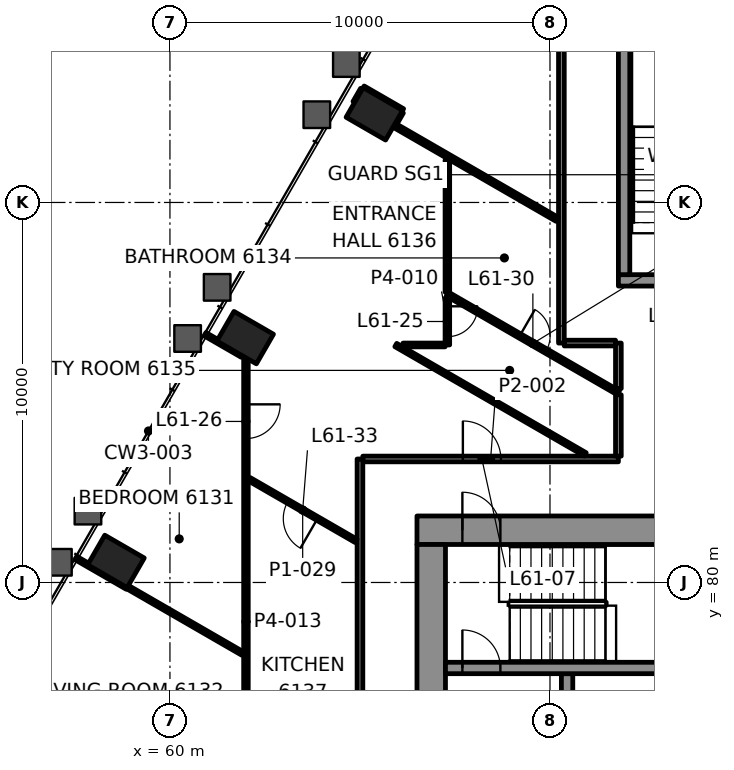
"""IFC4 building model, lengths in metres.
Left out: names, types, materials, properties, quantities, classifications, styles, units other than length and angle.
Written with IfcOpenShell. Run it as: python <this file> out.ifc"""

import sys

from ifc_helpers import new_model, si_unit, direction, frame, frame_2d, origin, origin_2d, place, context, subcontext, project, spatial, rectangle, hollow_rectangle, extrude, element, fill, save


model = new_model("IFC4")
c1 = context("Model", 3, precision=1e-05, world=origin(), true_north=direction((0.0, 1.0)))
c2 = subcontext(c1, "Body", "Model", "MODEL_VIEW")
j1 = project(units=[si_unit("LENGTHUNIT", "METRE"), si_unit("PLANEANGLEUNIT", "RADIAN")], contexts=[c1])
p1 = place(None, origin())
s1 = spatial("IfcSite", under=j1, at=p1, CompositionType="ELEMENT")
p2 = place(p1, origin())
s2 = spatial("IfcBuilding", under=s1, at=p2, CompositionType="ELEMENT")
p3 = place(p2, frame((0.0, 0.0, 260.1)))
s3 = spatial("IfcBuildingStorey", under=s2, at=p3, CompositionType="ELEMENT", Elevation=260.1)
for number, where, z_axis, x_axis in (
    (1, (65.379, 92.332, -0.0), (0.0, 0.0, 1.0), (-0.5, -0.866, 0.0)),
    (2, (61.979, 86.443, -0.0), (0.0, 0.0, 1.0), (-0.5, -0.866, 0.0)),
    (3, (58.579, 80.554, -0.0), (0.0, 0.0, 1.0), (-0.5, -0.866, 0.0)),
):
    element("IfcColumn", number, at=place(p3, frame(where, z_axis=z_axis, x_axis=x_axis)), inside=s3, PredefinedType="COLUMN", context=c2, shape_type="SweptSolid", body=[
        extrude(hollow_rectangle(XDim=0.9, YDim=1.2, WallThickness=0.06, at=origin_2d()), origin(), (0.0, 0.0, 1.0), 3.5),
    ])
p4 = place(p3, frame((66.5, 81.375, 0.0), z_axis=(0.0, 0.0, 1.0), x_axis=(1.0, 0.0, 0.0)))
e4 = element("IfcWall", 4, at=p4, inside=s3, PredefinedType="SHEAR", context=c2, shape_type="SweptSolid", body=[
    extrude(rectangle(XDim=17.0, YDim=0.75, at=frame_2d((8.5, 0.0))), origin(), (0.0, 0.0, 1.0), 3.3),
])
p5 = place(p4, frame((1.195, 0.0, 0.0)))
e5 = element("IfcOpeningElement", 5, at=p5, cuts=e4, PredefinedType="OPENING", context=c2, shape_type="SweptSolid", body=[
    extrude(rectangle(XDim=1.0, YDim=2.1, at=frame_2d((0.5, 1.05))), frame((0.0, 0.385, 0.0), z_axis=(0.0, -1.0, 0.0), x_axis=(1.0, 0.0, 0.0)), (0.0, 0.0, 1.0), 0.77),
])
p6 = place(p4, frame((15.005, 0.0, 0.0)))
e6 = element("IfcOpeningElement", 6, at=p6, cuts=e4, PredefinedType="OPENING", context=c2, shape_type="SweptSolid", body=[
    extrude(rectangle(XDim=1.0, YDim=2.1, at=frame_2d((0.5, 1.05))), frame((0.0, 0.385, 0.0), z_axis=(0.0, -1.0, 0.0), x_axis=(1.0, 0.0, 0.0)), (0.0, 0.0, 1.0), 0.77),
])
p7 = place(p4, frame((8.15, 0.0, 0.0)))
e7 = element("IfcOpeningElement", 7, at=p7, cuts=e4, PredefinedType="OPENING", context=c2, shape_type="SweptSolid", body=[
    extrude(rectangle(XDim=0.9, YDim=2.1, at=frame_2d((0.45, 1.05))), frame((0.0, 0.385, 0.0), z_axis=(0.0, -1.0, 0.0), x_axis=(1.0, 0.0, 0.0)), (0.0, 0.0, 1.0), 0.77),
])
p8 = place(p3, frame((66.875, 69.0, 0.0), z_axis=(0.0, 0.0, 1.0), x_axis=(0.0, 1.0, 0.0)))
e8 = element("IfcWall", 8, at=p8, inside=s3, PredefinedType="SHEAR", context=c2, shape_type="SweptSolid", body=[
    extrude(rectangle(XDim=12.0, YDim=0.75, at=frame_2d((6.0, 0.0))), origin(), (0.0, 0.0, 1.0), 3.3),
])
p9 = place(p8, frame((3.7, 0.0, 0.0)))
e9 = element("IfcOpeningElement", 9, at=p9, cuts=e8, PredefinedType="OPENING", context=c2, shape_type="SweptSolid", body=[
    extrude(rectangle(XDim=1.2, YDim=2.1, at=frame_2d((0.6, 1.05))), frame((0.0, 0.385, 0.0), z_axis=(0.0, -1.0, 0.0), x_axis=(1.0, 0.0, 0.0)), (0.0, 0.0, 1.0), 0.77),
])
p10 = place(p8, frame((0.925, 0.0, 0.0)))
e10 = element("IfcOpeningElement", 10, at=p10, cuts=e8, PredefinedType="OPENING", context=c2, shape_type="SweptSolid", body=[
    extrude(rectangle(XDim=0.9, YDim=2.1, at=frame_2d((0.45, 1.05))), frame((0.0, 0.385, 0.0), z_axis=(0.0, -1.0, 0.0), x_axis=(1.0, 0.0, 0.0)), (0.0, 0.0, 1.0), 0.77),
])
p11 = place(p3, frame((70.45, 75.0, 0.0), z_axis=(0.0, 0.0, 1.0), x_axis=(0.0, 1.0, 0.0)))
e11 = element("IfcWall", 11, at=p11, inside=s3, PredefinedType="SHEAR", context=c2, shape_type="SweptSolid", body=[
    extrude(rectangle(XDim=2.6, YDim=0.3, at=frame_2d((1.3, 0.0))), origin(), (0.0, 0.0, 1.0), 3.3),
])
p12 = place(p11, frame((0.15, 0.0, 0.0)))
e12 = element("IfcOpeningElement", 12, at=p12, cuts=e11, PredefinedType="OPENING", context=c2, shape_type="SweptSolid", body=[
    extrude(rectangle(XDim=1.1, YDim=2.1, at=frame_2d((0.55, 1.05))), frame((0.0, 0.16, 0.0), z_axis=(0.0, -1.0, 0.0), x_axis=(1.0, 0.0, 0.0)), (0.0, 0.0, 1.0), 0.32),
])
p13 = place(p3, frame((67.25, 77.75, 0.0), z_axis=(0.0, 0.0, 1.0), x_axis=(1.0, 0.0, 0.0)))
e13 = element("IfcWall", 13, at=p13, inside=s3, PredefinedType="SHEAR", context=c2, shape_type="SweptSolid", body=[
    extrude(rectangle(XDim=15.5, YDim=0.3, at=frame_2d((7.75, 0.0))), origin(), (0.0, 0.0, 1.0), 3.3),
])
p14 = place(p13, frame((0.445, 0.0, 0.0)))
e14 = element("IfcOpeningElement", 14, at=p14, cuts=e13, PredefinedType="OPENING", context=c2, shape_type="SweptSolid", body=[
    extrude(rectangle(XDim=1.0, YDim=2.1, at=frame_2d((0.5, 1.05))), frame((0.0, 0.16, 0.0), z_axis=(0.0, -1.0, 0.0), x_axis=(1.0, 0.0, 0.0)), (0.0, 0.0, 1.0), 0.32),
])
p15 = place(p3, frame((71.8, 87.95, 0.0), z_axis=(0.0, 0.0, 1.0), x_axis=(1.0, 0.0, 0.0)))
e15 = element("IfcWall", 15, at=p15, inside=s3, PredefinedType="SHEAR", context=c2, shape_type="SweptSolid", body=[
    extrude(rectangle(XDim=6.4, YDim=0.3, at=frame_2d((3.2, 0.0))), origin(), (0.0, 0.0, 1.0), 3.3),
])
p16 = place(p15, frame((1.325, 0.0, 0.0)))
e16 = element("IfcOpeningElement", 16, at=p16, cuts=e15, PredefinedType="OPENING", context=c2, shape_type="SweptSolid", body=[
    extrude(rectangle(XDim=1.0, YDim=2.1, at=frame_2d((0.5, 1.05))), frame((0.0, 0.16, 0.0), z_axis=(0.0, -1.0, 0.0), x_axis=(1.0, 0.0, 0.0)), (0.0, 0.0, 1.0), 0.32),
])
p17 = place(p15, frame((4.125, 0.0, 0.0)))
e17 = element("IfcOpeningElement", 17, at=p17, cuts=e15, PredefinedType="OPENING", context=c2, shape_type="SweptSolid", body=[
    extrude(rectangle(XDim=1.2, YDim=2.1, at=frame_2d((0.6, 1.05))), frame((0.0, 0.16, 0.0), z_axis=(0.0, -1.0, 0.0), x_axis=(1.0, 0.0, 0.0)), (0.0, 0.0, 1.0), 0.32),
])
p18 = place(p3, frame((71.95, 88.1, 0.0), z_axis=(0.0, 0.0, 1.0), x_axis=(0.0, 1.0, 0.0)))
e18 = element("IfcWall", 18, at=p18, inside=s3, PredefinedType="SHEAR", context=c2, shape_type="SweptSolid", body=[
    extrude(rectangle(XDim=6.2, YDim=0.3, at=frame_2d((3.1, 0.0))), origin(), (0.0, 0.0, 1.0), 3.3),
])
p19 = place(p3, frame((65.075, 83.25, 0.0), z_axis=(0.0, 0.0, 1.0), x_axis=(1.0, 0.0, 0.0)))
e19 = element("IfcWall", 19, at=p19, inside=s3, PredefinedType="PARTITIONING", context=c2, shape_type="SweptSolid", body=[
    extrude(rectangle(XDim=6.725, YDim=0.15, at=frame_2d((3.362, 0.0))), origin(), (0.0, 0.0, 1.0), 2.7),
])
p20 = place(p19, frame((2.632, 0.0, 0.0)))
e20 = element("IfcOpeningElement", 20, at=p20, cuts=e19, PredefinedType="OPENING", context=c2, shape_type="SweptSolid", body=[
    extrude(rectangle(XDim=1.0, YDim=2.1, at=frame_2d((0.5, 1.05))), frame((0.0, 0.085, 0.0), z_axis=(0.0, -1.0, 0.0), x_axis=(1.0, 0.0, 0.0)), (0.0, 0.0, 1.0), 0.17),
])
p21 = place(p3, frame((66.133, 86.25, 0.0), z_axis=(0.0, 0.0, 1.0), x_axis=(1.0, 0.0, 0.0)))
e21 = element("IfcWall", 21, at=p21, inside=s3, PredefinedType="PARTITIONING", context=c2, shape_type="SweptSolid", body=[
    extrude(rectangle(XDim=1.106, YDim=0.1, at=frame_2d((0.553, 0.0))), origin(), (0.0, 0.0, 1.0), 2.7),
])
p22 = place(p3, frame((70.375, 86.3, 0.0), z_axis=(0.0, 0.0, 1.0), x_axis=(1.0, 0.0, 0.0)))
e22 = element("IfcWall", 22, at=p22, inside=s3, PredefinedType="PARTITIONING", context=c2, shape_type="SweptSolid", body=[
    extrude(rectangle(XDim=1.35, YDim=0.15, at=frame_2d((0.675, 0.0))), origin(), (0.0, 0.0, 1.0), 2.7),
])
p23 = place(p3, frame((65.929, 92.085, 0.0), z_axis=(0.0, 0.0, 1.0), x_axis=(0.49970167553, 0.866197573001, 0.0)))
e23 = element("IfcWall", 23, at=p23, inside=s3, PredefinedType="PARTITIONING", context=c2, shape_type="SweptSolid", body=[
    extrude(rectangle(XDim=0.339, YDim=0.1, at=frame_2d((0.169, 0.0))), origin(), (0.0, 0.0, 1.0), 2.7),
])
p24 = place(p3, frame((64.86, 92.633, 0.0), z_axis=(0.0, 0.0, 1.0), x_axis=(0.500481453673, 0.865747257882, 0.0)))
e24 = element("IfcWall", 24, at=p24, inside=s3, PredefinedType="PARTITIONING", context=c2, shape_type="SweptSolid", body=[
    extrude(rectangle(XDim=0.399, YDim=0.1, at=frame_2d((0.199, 0.0))), origin(), (0.0, 0.0, 1.0), 2.7),
])
p25 = place(p3, frame((71.8, 83.325, 0.0), z_axis=(0.0, 0.0, 1.0), x_axis=(0.0, 1.0, 0.0)))
e25 = element("IfcWall", 25, at=p25, inside=s3, PredefinedType="PARTITIONING", context=c2, shape_type="SweptSolid", body=[
    extrude(rectangle(XDim=1.614, YDim=0.15, at=frame_2d((0.807, 0.0))), origin(), (0.0, 0.0, 1.0), 2.622),
])
p26 = place(p3, frame((70.3, 86.3, 0.0), z_axis=(0.0, 0.0, 1.0), x_axis=(0.0, 1.0, 0.0)))
e26 = element("IfcWall", 26, at=p26, inside=s3, PredefinedType="PARTITIONING", context=c2, shape_type="SweptSolid", body=[
    extrude(rectangle(XDim=9.8, YDim=0.15, at=frame_2d((4.9, 0.0))), origin(), (0.0, 0.0, 1.0), 2.7),
])
p27 = place(p3, frame((67.3, 87.485, 0.0), z_axis=(0.0, 0.0, 1.0), x_axis=(0.0, -1.0, 0.0)))
e27 = element("IfcWall", 27, at=p27, inside=s3, PredefinedType="PARTITIONING", context=c2, shape_type="SweptSolid", body=[
    extrude(rectangle(XDim=1.234, YDim=0.12, at=frame_2d((0.617, 0.0))), origin(), (0.0, 0.0, 1.0), 2.622),
])
p28 = place(p27, frame((0.217, 0.0, 0.0)))
e28 = element("IfcOpeningElement", 28, at=p28, cuts=e27, PredefinedType="OPENING", context=c2, shape_type="SweptSolid", body=[
    extrude(rectangle(XDim=0.8, YDim=2.1, at=frame_2d((0.4, 1.05))), frame((0.0, 0.07, 0.0), z_axis=(0.0, -1.0, 0.0), x_axis=(1.0, 0.0, 0.0)), (0.0, 0.0, 1.0), 0.14),
])
p29 = place(p3, frame((65.0, 70.352, 0.0), z_axis=(0.0, 0.0, 1.0), x_axis=(0.0, 1.0, 0.0)))
e29 = element("IfcWall", 29, at=p29, inside=s3, PredefinedType="PARTITIONING", context=c2, shape_type="SweptSolid", body=[
    extrude(rectangle(XDim=12.897, YDim=0.15, at=frame_2d((6.449, 0.0))), origin(), (0.0, 0.0, 1.0), 2.7),
])
p30 = place(p3, frame((62.0, 85.912, 0.0), z_axis=(0.0, 0.0, 1.0), x_axis=(0.0, -1.0, 0.0)))
e30 = element("IfcWall", 30, at=p30, inside=s3, PredefinedType="PARTITIONING", context=c2, shape_type="SweptSolid", body=[
    extrude(rectangle(XDim=13.888, YDim=0.12, at=frame_2d((6.944, 0.0))), origin(), (0.0, 0.0, 1.0), 2.7),
])
p31 = place(p30, frame((1.224, 0.0, 0.0)))
e31 = element("IfcOpeningElement", 31, at=p31, cuts=e30, PredefinedType="OPENING", context=c2, shape_type="SweptSolid", body=[
    extrude(rectangle(XDim=0.9, YDim=2.1, at=frame_2d((0.45, 1.05))), frame((0.0, 0.07, 0.0), z_axis=(0.0, -1.0, 0.0), x_axis=(1.0, 0.0, 0.0)), (0.0, 0.0, 1.0), 0.14),
])
p32 = place(p30, frame((9.49, 0.0, 0.0)))
e32 = element("IfcOpeningElement", 32, at=p32, cuts=e30, PredefinedType="OPENING", context=c2, shape_type="SweptSolid", body=[
    extrude(rectangle(XDim=0.9, YDim=2.1, at=frame_2d((0.45, 1.05))), frame((0.0, 0.07, 0.0), z_axis=(0.0, -1.0, 0.0), x_axis=(1.0, 0.0, 0.0)), (0.0, 0.0, 1.0), 0.14),
])
p33 = place(p30, frame((12.466, 0.0, 0.0)))
e33 = element("IfcOpeningElement", 33, at=p33, cuts=e30, PredefinedType="OPENING", context=c2, shape_type="SweptSolid", body=[
    extrude(rectangle(XDim=0.8, YDim=2.1, at=frame_2d((0.4, 1.05))), frame((0.0, 0.07, 0.0), z_axis=(0.0, -1.0, 0.0), x_axis=(1.0, 0.0, 0.0)), (0.0, 0.0, 1.0), 0.14),
])
p34 = place(p3, frame((66.124, 92.422, 0.0), z_axis=(0.0, 0.0, 1.0), x_axis=(-0.865978732077, 0.500080829057, 0.0)))
e34 = element("IfcWall", 34, at=p34, inside=s3, PredefinedType="PARTITIONING", context=c2, shape_type="SweptSolid", body=[
    extrude(rectangle(XDim=1.199, YDim=0.1, at=frame_2d((0.6, 0.0))), origin(), (0.0, 0.0, 1.0), 2.688),
])
p35 = place(p3, frame((70.19, 89.555, 0.0), z_axis=(0.0, 0.0, 1.0), x_axis=(-0.866036249428, 0.499981214323, 0.0)))
e35 = element("IfcWall", 35, at=p35, inside=s3, PredefinedType="PARTITIONING", context=c2, shape_type="SweptSolid", body=[
    extrude(rectangle(XDim=4.955, YDim=0.12, at=frame_2d((2.478, 0.0))), origin(), (0.0, 0.0, 1.0), 2.7),
])
p36 = place(p3, frame((67.3, 87.589, 0.0), z_axis=(0.0, 0.0, 1.0), x_axis=(0.866019710441, -0.50000986103, 0.0)))
e36 = element("IfcWall", 36, at=p36, inside=s3, PredefinedType="PARTITIONING", context=c2, shape_type="SweptSolid", body=[
    extrude(rectangle(XDim=5.196, YDim=0.12, at=frame_2d((2.598, 0.0))), origin(), (0.0, 0.0, 1.0), 2.7),
])
p37 = place(p36, frame((2.198, 0.0, 0.0)))
e37 = element("IfcOpeningElement", 37, at=p37, cuts=e36, PredefinedType="OPENING", context=c2, shape_type="SweptSolid", body=[
    extrude(rectangle(XDim=0.8, YDim=2.1, at=frame_2d((0.4, 1.05))), frame((0.0, 0.07, 0.0), z_axis=(0.0, -1.0, 0.0), x_axis=(1.0, 0.0, 0.0)), (0.0, 0.0, 1.0), 0.14),
])
p38 = place(p3, frame((70.929, 83.37, 0.0), z_axis=(0.0, 0.0, 1.0), x_axis=(-0.866032366698, 0.499987939687, 0.0)))
e38 = element("IfcWall", 38, at=p38, inside=s3, PredefinedType="PARTITIONING", context=c2, shape_type="SweptSolid", body=[
    extrude(rectangle(XDim=5.758, YDim=0.1, at=frame_2d((2.879, 0.0))), origin(), (0.0, 0.0, 1.0), 2.7),
])
p39 = place(p3, frame((61.901, 85.969, 0.0), z_axis=(0.0, 0.0, 1.0), x_axis=(-0.866106388984, 0.499859703278, 0.0)))
e39 = element("IfcWall", 39, at=p39, inside=s3, PredefinedType="PARTITIONING", context=c2, shape_type="SweptSolid", body=[
    extrude(rectangle(XDim=1.129, YDim=0.1, at=frame_2d((0.564, 0.0))), origin(), (0.0, 0.0, 1.0), 2.688),
])
p40 = place(p3, frame((64.899, 81.094, 0.0), z_axis=(0.0, 0.0, 1.0), x_axis=(-0.866032882975, 0.499987045439, 0.0)))
e40 = element("IfcWall", 40, at=p40, inside=s3, PredefinedType="PARTITIONING", context=c2, shape_type="SweptSolid", body=[
    extrude(rectangle(XDim=3.248, YDim=0.1, at=frame_2d((1.624, 0.0))), origin(), (0.0, 0.0, 1.0), 2.7),
])
p41 = place(p40, frame((1.174, 0.0, 0.0)))
e41 = element("IfcOpeningElement", 41, at=p41, cuts=e40, PredefinedType="OPENING", context=c2, shape_type="SweptSolid", body=[
    extrude(rectangle(XDim=0.9, YDim=2.1, at=frame_2d((0.45, 1.05))), frame((0.0, 0.06, 0.0), z_axis=(0.0, -1.0, 0.0), x_axis=(1.0, 0.0, 0.0)), (0.0, 0.0, 1.0), 0.12),
])
p42 = place(p3, frame((61.914, 78.129, 0.0), z_axis=(0.0, 0.0, 1.0), x_axis=(-0.866011380966, 0.500024287448, 0.0)))
e42 = element("IfcWall", 42, at=p42, inside=s3, PredefinedType="PARTITIONING", context=c2, shape_type="SweptSolid", body=[
    extrude(rectangle(XDim=3.501, YDim=0.1, at=frame_2d((1.75, 0.0))), origin(), (0.0, 0.0, 1.0), 2.7),
])
p43 = place(p3, frame((58.874, 79.865, 0.0), z_axis=(0.0, 0.0, 1.0), x_axis=(-0.865990094875, 0.500061151839, 0.0)))
e43 = element("IfcWall", 43, at=p43, inside=s3, PredefinedType="PARTITIONING", context=c2, shape_type="SweptSolid", body=[
    extrude(rectangle(XDim=1.56, YDim=0.1, at=frame_2d((0.78, 0.0))), origin(), (0.0, 0.0, 1.0), 2.688),
])
p44 = place(p3, frame((71.8, 85.103, 0.0), z_axis=(0.0, 0.0, 1.0), x_axis=(0.0, 1.0, 0.0)))
e44 = element("IfcWall", 44, at=p44, inside=s3, PredefinedType="PARTITIONING", context=c2, shape_type="SweptSolid", body=[
    extrude(rectangle(XDim=1.197, YDim=0.15, at=frame_2d((0.598, 0.0))), origin(), (0.0, 0.0, 1.0), 2.7),
])
p45 = place(p3, frame((67.3, 87.641, 0.0), z_axis=(0.0, 0.0, 1.0), x_axis=(0.0, 1.0, 0.0)))
e45 = element("IfcWall", 45, at=p45, inside=s3, PredefinedType="PARTITIONING", context=c2, shape_type="SweptSolid", body=[
    extrude(rectangle(XDim=3.473, YDim=0.12, at=frame_2d((1.737, 0.0))), origin(), (0.0, 0.0, 1.0), 2.7),
])
p46 = place(p20, origin())
e46 = element("IfcDoor", 46, at=p46, inside=s3, OperationType="SINGLE_SWING_LEFT", PredefinedType="DOOR", context=c2, shape_type="SweptSolid", body=[
    extrude(rectangle(XDim=1.0, YDim=2.1, at=frame_2d((0.5, 1.05))), frame((0.0, 0.025, 0.0), z_axis=(0.0, -1.0, 0.0), x_axis=(1.0, 0.0, 0.0)), (0.0, 0.0, 1.0), 0.05),
])
fill(e20, e46)
p47 = place(p28, origin())
e47 = element("IfcDoor", 47, at=p47, inside=s3, OperationType="SINGLE_SWING_LEFT", PredefinedType="DOOR", context=c2, shape_type="SweptSolid", body=[
    extrude(rectangle(XDim=0.8, YDim=2.1, at=frame_2d((0.4, 1.05))), frame((0.0, 0.025, 0.0), z_axis=(0.0, -1.0, 0.0), x_axis=(1.0, 0.0, 0.0)), (0.0, 0.0, 1.0), 0.05),
])
fill(e28, e47)
p48 = place(p31, origin())
e48 = element("IfcDoor", 48, at=p48, inside=s3, OperationType="SINGLE_SWING_RIGHT", PredefinedType="DOOR", context=c2, shape_type="SweptSolid", body=[
    extrude(rectangle(XDim=0.9, YDim=2.1, at=frame_2d((0.45, 1.05))), frame((0.0, 0.025, 0.0), z_axis=(0.0, -1.0, 0.0), x_axis=(1.0, 0.0, 0.0)), (0.0, 0.0, 1.0), 0.05),
])
fill(e31, e48)
p49 = place(p37, origin())
e49 = element("IfcDoor", 49, at=p49, inside=s3, OperationType="SINGLE_SWING_LEFT", PredefinedType="DOOR", context=c2, shape_type="SweptSolid", body=[
    extrude(rectangle(XDim=0.8, YDim=2.1, at=frame_2d((0.4, 1.05))), frame((0.0, 0.025, 0.0), z_axis=(0.0, -1.0, 0.0), x_axis=(1.0, 0.0, 0.0)), (0.0, 0.0, 1.0), 0.05),
])
fill(e37, e49)
p50 = place(p41, origin())
e50 = element("IfcDoor", 50, at=p50, inside=s3, OperationType="SINGLE_SWING_RIGHT", PredefinedType="DOOR", context=c2, shape_type="SweptSolid", body=[
    extrude(rectangle(XDim=0.9, YDim=2.1, at=frame_2d((0.45, 1.05))), frame((0.0, 0.025, 0.0), z_axis=(0.0, -1.0, 0.0), x_axis=(1.0, 0.0, 0.0)), (0.0, 0.0, 1.0), 0.05),
])
fill(e41, e50)
p51 = place(p14, origin())
e51 = element("IfcDoor", 51, at=p51, inside=s3, OperationType="SINGLE_SWING_LEFT", PredefinedType="DOOR", context=c2, shape_type="SweptSolid", body=[
    extrude(rectangle(XDim=1.0, YDim=2.1, at=frame_2d((0.5, 1.05))), frame((0.0, 0.025, 0.0), z_axis=(0.0, -1.0, 0.0), x_axis=(1.0, 0.0, 0.0)), (0.0, 0.0, 1.0), 0.05),
])
fill(e14, e51)
p52 = place(p5, origin())
e52 = element("IfcDoor", 52, at=p52, inside=s3, OperationType="SINGLE_SWING_RIGHT", PredefinedType="DOOR", context=c2, shape_type="SweptSolid", body=[
    extrude(rectangle(XDim=1.0, YDim=2.1, at=frame_2d((0.5, 1.05))), frame((0.0, 0.095, 0.0), z_axis=(0.0, -1.0, 0.0), x_axis=(1.0, 0.0, 0.0)), (0.0, 0.0, 1.0), 0.19),
])
fill(e5, e52)
save(model, sys.argv[1])
